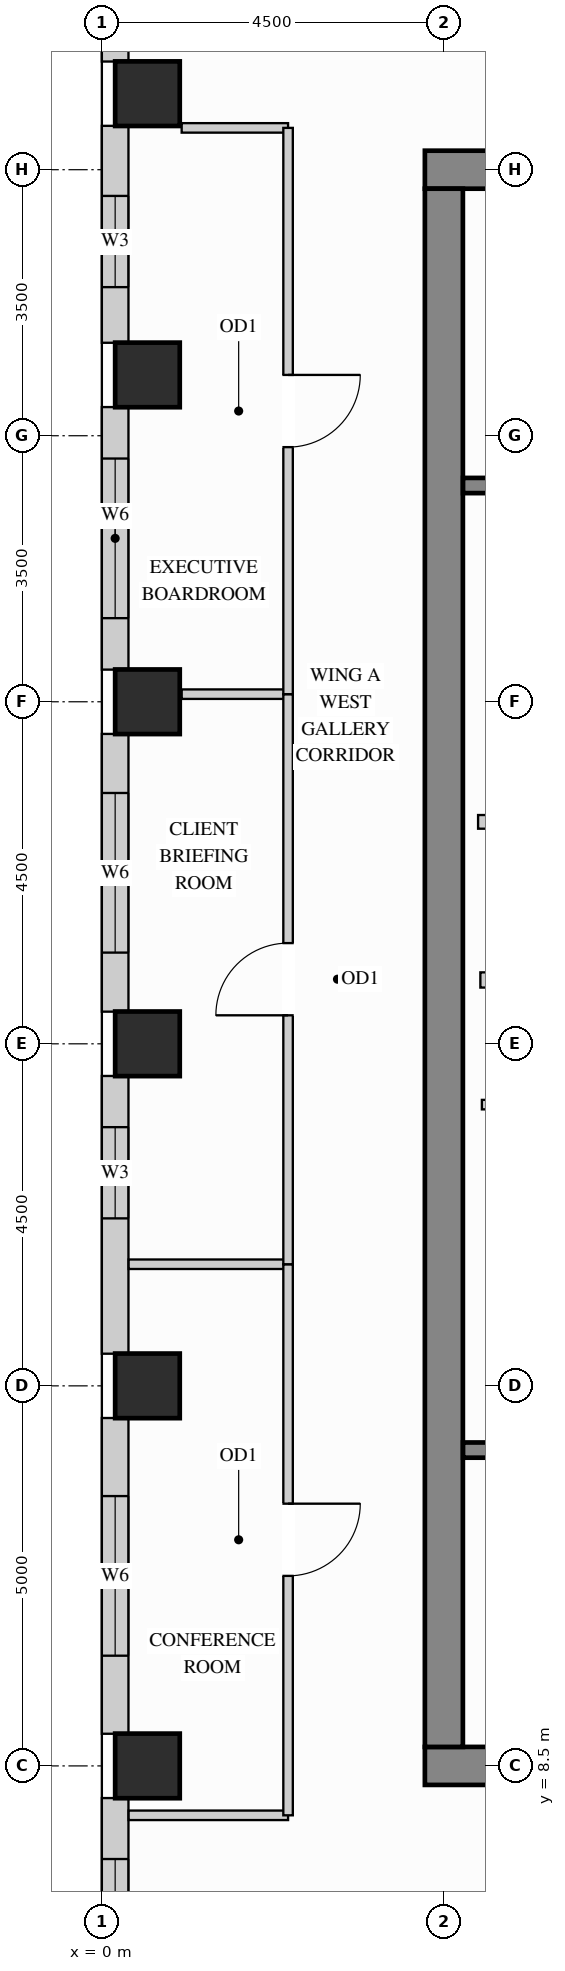
"""IFC4 building model, lengths in metres.
Left out: names, types, materials, properties, quantities, classifications, styles, units other than length and angle.
Written with IfcOpenShell. Run it as: python <this file> out.ifc"""

import sys

from ifc_helpers import new_model, si_unit, direction, frame, frame_2d, origin, origin_2d, place, context, subcontext, project, spatial, rectangle, extrude, source, transform, mapped, element, fill, save


model = new_model("IFC4")
c1 = context("Model", 3, precision=1e-05, world=origin(), true_north=direction((0.0, 1.0)))
c2 = subcontext(c1, "Body", "Model", "MODEL_VIEW")
j1 = project(units=[si_unit("LENGTHUNIT", "METRE"), si_unit("PLANEANGLEUNIT", "RADIAN")], contexts=[c1])
p1 = place(None, origin())
s1 = spatial("IfcSite", under=j1, at=p1, CompositionType="ELEMENT")
p2 = place(p1, origin())
s2 = spatial("IfcBuilding", under=s1, at=p2, CompositionType="ELEMENT")
p3 = place(p2, frame((0.0, 0.0, 259.2)))
s3 = spatial("IfcBuildingStorey", under=s2, at=p3, CompositionType="ELEMENT", Elevation=259.2)
m1 = source(origin(), c2, "Body", "SweptSolid", [
    extrude(rectangle(XDim=0.85, YDim=0.85, at=origin_2d()), origin(), (0.0, 0.0, 1.0), 3.4),
])
for number, where, z_axis, x_axis in (
    (1, (0.6, 13.5, 0.0), (0.0, 0.0, 1.0), (1.0, 0.0, 0.0)),
    (2, (0.6, 18.0, 0.0), (0.0, 0.0, 1.0), (1.0, 0.0, 0.0)),
    (3, (0.6, 22.5, 0.0), (0.0, 0.0, 1.0), (1.0, 0.0, 0.0)),
    (4, (0.6, 26.8, 0.0), (0.0, 0.0, 1.0), (1.0, 0.0, 0.0)),
    (5, (0.6, 30.5, 0.0), (0.0, 0.0, 1.0), (1.0, 0.0, 0.0)),
    (6, (0.6, 8.5, 0.0), (0.0, 0.0, 1.0), (1.0, 0.0, 0.0)),
):
    element("IfcColumn", number, at=place(p3, frame(where, z_axis=z_axis, x_axis=x_axis)), inside=s3, PredefinedType="COLUMN", context=c2, shape_type="MappedRepresentation", body=[
        mapped(m1, transform((0.0, 0.0, 0.0), x_axis=(1.0, 0.0, 0.0), y_axis=(0.0, 1.0, 0.0), z_axis=(0.0, 0.0, 1.0))),
    ])
m2 = source(origin(), c2, "Body", "SweptSolid", [
    extrude(rectangle(XDim=10.5, YDim=0.5, at=frame_2d((5.25, 0.0))), origin(), (0.0, 0.0, 1.0), 3.4),
])
for number, where, z_axis, x_axis in (
    (7, (4.25, 29.5, 0.0), (0.0, 0.0, 1.0), (1.0, 0.0, 0.0)),
    (8, (4.25, 8.5, 0.0), (0.0, 0.0, 1.0), (1.0, 0.0, 0.0)),
):
    element("IfcWall", number, at=place(p3, frame(where, z_axis=z_axis, x_axis=x_axis)), inside=s3, PredefinedType="SHEAR", context=c2, shape_type="MappedRepresentation", body=[
        mapped(m2, transform((0.0, 0.0, 0.0), x_axis=(1.0, 0.0, 0.0), y_axis=(0.0, 1.0, 0.0), z_axis=(0.0, 0.0, 1.0))),
    ])
m3 = source(origin(), c2, "Body", "SweptSolid", [
    extrude(rectangle(XDim=20.5, YDim=0.5, at=frame_2d((10.25, 0.0))), origin(), (0.0, 0.0, 1.0), 3.4),
])
p4 = place(p3, frame((4.5, 8.75, 0.0), z_axis=(0.0, 0.0, 1.0), x_axis=(0.0, 1.0, 0.0)))
e9 = element("IfcWall", 9, at=p4, inside=s3, PredefinedType="SHEAR", context=c2, shape_type="MappedRepresentation", body=[
    mapped(m3, transform((0.0, 0.0, 0.0), x_axis=(1.0, 0.0, 0.0), y_axis=(0.0, 1.0, 0.0), z_axis=(0.0, 0.0, 1.0))),
])
m4 = source(origin(), c2, "Body", "SweptSolid", [
    extrude(rectangle(XDim=0.527, YDim=0.35, at=frame_2d((0.263, 0.0))), origin(), (0.0, 0.0, 1.0), 3.385),
])
p5 = place(p3, frame((0.175, 31.45, 0.0), z_axis=(0.0, 0.0, 1.0), x_axis=(0.0, -1.0, 0.0)))
e10 = element("IfcWall", 10, at=p5, inside=s3, PredefinedType="SOLIDWALL", context=c2, shape_type="MappedRepresentation", body=[
    mapped(m4, transform((0.0, 0.0, 0.0), x_axis=(1.0, 0.0, 0.0), y_axis=(0.0, 1.0, 0.0), z_axis=(0.0, 0.0, 1.0))),
])
p6 = place(p3, frame((0.175, 30.077, 0.0), z_axis=(0.0, 0.0, 1.0), x_axis=(0.0, -1.0, 0.0)))
e11 = element("IfcWall", 11, at=p6, inside=s3, PredefinedType="SOLIDWALL", context=c2, shape_type="SweptSolid", body=[
    extrude(rectangle(XDim=2.854, YDim=0.35, at=frame_2d((1.427, 0.0))), origin(), (0.0, 0.0, 1.0), 3.385),
])
p7 = place(p6, frame((0.922, 0.0, 0.78)))
e12 = element("IfcOpeningElement", 12, at=p7, cuts=e11, PredefinedType="OPENING", context=c2, shape_type="SweptSolid", body=[
    extrude(rectangle(XDim=1.2, YDim=2.25, at=frame_2d((0.6, 1.125))), frame((0.0, 0.185, 0.0), z_axis=(0.0, -1.0, 0.0), x_axis=(1.0, 0.0, 0.0)), (0.0, 0.0, 1.0), 0.37),
])
p8 = place(p3, frame((0.175, 26.377, 0.0), z_axis=(0.0, 0.0, 1.0), x_axis=(0.0, -1.0, 0.0)))
e13 = element("IfcWall", 13, at=p8, inside=s3, PredefinedType="SOLIDWALL", context=c2, shape_type="SweptSolid", body=[
    extrude(rectangle(XDim=3.454, YDim=0.35, at=frame_2d((1.727, 0.0))), origin(), (0.0, 0.0, 1.0), 3.385),
])
p9 = place(p8, frame((0.677, 0.0, 0.78)))
e14 = element("IfcOpeningElement", 14, at=p9, cuts=e13, PredefinedType="OPENING", context=c2, shape_type="SweptSolid", body=[
    extrude(rectangle(XDim=2.1, YDim=2.25, at=frame_2d((1.05, 1.125))), frame((0.0, 0.185, 0.0), z_axis=(0.0, -1.0, 0.0), x_axis=(1.0, 0.0, 0.0)), (0.0, 0.0, 1.0), 0.37),
])
p10 = place(p3, frame((0.175, 22.077, 0.0), z_axis=(0.0, 0.0, 1.0), x_axis=(0.0, -1.0, 0.0)))
e15 = element("IfcWall", 15, at=p10, inside=s3, PredefinedType="SOLIDWALL", context=c2, shape_type="SweptSolid", body=[
    extrude(rectangle(XDim=3.654, YDim=0.35, at=frame_2d((1.827, 0.0))), origin(), (0.0, 0.0, 1.0), 3.385),
])
p11 = place(p10, frame((0.777, 0.0, 0.78)))
e16 = element("IfcOpeningElement", 16, at=p11, cuts=e15, PredefinedType="OPENING", context=c2, shape_type="SweptSolid", body=[
    extrude(rectangle(XDim=2.1, YDim=2.25, at=frame_2d((1.05, 1.125))), frame((0.0, 0.185, 0.0), z_axis=(0.0, -1.0, 0.0), x_axis=(1.0, 0.0, 0.0)), (0.0, 0.0, 1.0), 0.37),
])
p12 = place(p3, frame((0.175, 17.577, 0.0), z_axis=(0.0, 0.0, 1.0), x_axis=(0.0, -1.0, 0.0)))
e17 = element("IfcWall", 17, at=p12, inside=s3, PredefinedType="SOLIDWALL", context=c2, shape_type="SweptSolid", body=[
    extrude(rectangle(XDim=3.654, YDim=0.35, at=frame_2d((1.827, 0.0))), origin(), (0.0, 0.0, 1.0), 3.385),
])
p13 = place(p12, frame((0.674, 0.0, 0.78)))
e18 = element("IfcOpeningElement", 18, at=p13, cuts=e17, PredefinedType="OPENING", context=c2, shape_type="SweptSolid", body=[
    extrude(rectangle(XDim=1.2, YDim=2.25, at=frame_2d((0.6, 1.125))), frame((0.0, 0.185, 0.0), z_axis=(0.0, -1.0, 0.0), x_axis=(1.0, 0.0, 0.0)), (0.0, 0.0, 1.0), 0.37),
])
p14 = place(p3, frame((0.175, 13.077, 0.0), z_axis=(0.0, 0.0, 1.0), x_axis=(0.0, -1.0, 0.0)))
e19 = element("IfcWall", 19, at=p14, inside=s3, PredefinedType="SOLIDWALL", context=c2, shape_type="SweptSolid", body=[
    extrude(rectangle(XDim=4.154, YDim=0.35, at=frame_2d((2.077, 0.0))), origin(), (0.0, 0.0, 1.0), 3.385),
])
p15 = place(p14, frame((1.027, 0.0, 0.78)))
e20 = element("IfcOpeningElement", 20, at=p15, cuts=e19, PredefinedType="OPENING", context=c2, shape_type="SweptSolid", body=[
    extrude(rectangle(XDim=2.1, YDim=2.25, at=frame_2d((1.05, 1.125))), frame((0.0, 0.185, 0.0), z_axis=(0.0, -1.0, 0.0), x_axis=(1.0, 0.0, 0.0)), (0.0, 0.0, 1.0), 0.37),
])
p16 = place(p3, frame((0.175, 8.077, 0.0), z_axis=(0.0, 0.0, 1.0), x_axis=(0.0, -1.0, 0.0)))
e21 = element("IfcWall", 21, at=p16, inside=s3, PredefinedType="SOLIDWALL", context=c2, shape_type="SweptSolid", body=[
    extrude(rectangle(XDim=4.154, YDim=0.35, at=frame_2d((2.077, 0.0))), origin(), (0.0, 0.0, 1.0), 3.385),
])
p17 = place(p16, frame((0.802, 0.0, 0.78)))
e22 = element("IfcOpeningElement", 22, at=p17, cuts=e21, PredefinedType="OPENING", context=c2, shape_type="SweptSolid", body=[
    extrude(rectangle(XDim=1.2, YDim=2.25, at=frame_2d((0.6, 1.125))), frame((0.0, 0.185, 0.0), z_axis=(0.0, -1.0, 0.0), x_axis=(1.0, 0.0, 0.0)), (0.0, 0.0, 1.0), 0.37),
])
m5 = source(origin(), c2, "Body", "SweptSolid", [
    extrude(rectangle(XDim=2.2, YDim=0.18, at=frame_2d((1.1, 0.0))), origin(), (0.0, 0.0, 1.0), 3.385),
])
p18 = place(p3, frame((4.95, 20.92, 0.0), z_axis=(0.0, 0.0, 1.0), x_axis=(1.0, 0.0, 0.0)))
e23 = element("IfcWall", 23, at=p18, inside=s3, PredefinedType="PARTITIONING", context=c2, shape_type="MappedRepresentation", body=[
    mapped(m5, transform((0.0, 0.0, 0.0), x_axis=(1.0, 0.0, 0.0), y_axis=(0.0, 1.0, 0.0), z_axis=(0.0, 0.0, 1.0))),
])
p19 = place(p3, frame((5.0, 17.2, 0.0), z_axis=(0.0, 0.0, 1.0), x_axis=(1.0, 0.0, 0.0)))
e24 = element("IfcWall", 24, at=p19, inside=s3, PredefinedType="PARTITIONING", context=c2, shape_type="SweptSolid", body=[
    extrude(rectangle(XDim=2.4, YDim=0.125, at=frame_2d((1.2, 0.0))), origin(), (0.0, 0.0, 1.0), 3.385),
])
p20 = place(p19, frame((0.7, 0.0, 0.0)))
e25 = element("IfcOpeningElement", 25, at=p20, cuts=e24, PredefinedType="OPENING", context=c2, shape_type="SweptSolid", body=[
    extrude(rectangle(XDim=0.85, YDim=2.1, at=frame_2d((0.425, 1.05))), frame((0.0, 0.073, 0.0), z_axis=(0.0, -1.0, 0.0), x_axis=(1.0, 0.0, 0.0)), (0.0, 0.0, 1.0), 0.145),
])
m6 = source(origin(), c2, "Body", "SweptSolid", [
    extrude(rectangle(XDim=1.4, YDim=0.125, at=frame_2d((0.7, 0.0))), origin(), (0.0, 0.0, 1.0), 1.585),
])
p21 = place(p3, frame((1.05, 30.05, 0.0), z_axis=(0.0, 0.0, 1.0), x_axis=(1.0, 0.0, 0.0)))
e26 = element("IfcWall", 26, at=p21, inside=s3, PredefinedType="PARTITIONING", context=c2, shape_type="MappedRepresentation", body=[
    mapped(m6, transform((0.0, 0.0, 0.0), x_axis=(1.0, 0.0, 0.0), y_axis=(0.0, 1.0, 0.0), z_axis=(0.0, 0.0, 1.0))),
])
m7 = source(origin(), c2, "Body", "SweptSolid", [
    extrude(rectangle(XDim=2.098, YDim=0.125, at=frame_2d((1.049, 0.0))), origin(), (0.0, 0.0, 1.0), 3.385),
])
for number, where, z_axis, x_axis in (
    (27, (0.352, 7.85, 0.0), (0.0, 0.0, 1.0), (1.0, 0.0, 0.0)),
    (28, (0.352, 15.1, 0.0), (0.0, 0.0, 1.0), (1.0, 0.0, 0.0)),
):
    element("IfcWall", number, at=place(p3, frame(where, z_axis=z_axis, x_axis=x_axis)), inside=s3, PredefinedType="PARTITIONING", context=c2, shape_type="MappedRepresentation", body=[
        mapped(m7, transform((0.0, 0.0, 0.0), x_axis=(1.0, 0.0, 0.0), y_axis=(0.0, 1.0, 0.0), z_axis=(0.0, 0.0, 1.0))),
    ])
m8 = source(origin(), c2, "Body", "SweptSolid", [
    extrude(rectangle(XDim=1.4, YDim=0.125, at=frame_2d((0.7, 0.0))), origin(), (0.0, 0.0, 1.0), 3.385),
])
p22 = place(p3, frame((1.05, 22.6, 0.0), z_axis=(0.0, 0.0, 1.0), x_axis=(1.0, 0.0, 0.0)))
e29 = element("IfcWall", 29, at=p22, inside=s3, PredefinedType="PARTITIONING", context=c2, shape_type="MappedRepresentation", body=[
    mapped(m8, transform((0.0, 0.0, 0.0), x_axis=(1.0, 0.0, 0.0), y_axis=(0.0, 1.0, 0.0), z_axis=(0.0, 0.0, 1.0))),
])
p23 = place(p3, frame((2.45, 7.85, 0.0), z_axis=(0.0, 0.0, 1.0), x_axis=(0.0, 1.0, 0.0)))
e30 = element("IfcWall", 30, at=p23, inside=s3, PredefinedType="PARTITIONING", context=c2, shape_type="SweptSolid", body=[
    extrude(rectangle(XDim=7.25, YDim=0.125, at=frame_2d((3.625, 0.0))), origin(), (0.0, 0.0, 1.0), 3.385),
])
p24 = place(p23, frame((3.15, 0.0, 0.0)))
e31 = element("IfcOpeningElement", 31, at=p24, cuts=e30, PredefinedType="OPENING", context=c2, shape_type="SweptSolid", body=[
    extrude(rectangle(XDim=0.95, YDim=2.15, at=frame_2d((0.475, 1.075))), frame((0.0, 0.073, 0.0), z_axis=(0.0, -1.0, 0.0), x_axis=(1.0, 0.0, 0.0)), (0.0, 0.0, 1.0), 0.145),
])
p25 = place(p3, frame((2.45, 15.1, 0.0), z_axis=(0.0, 0.0, 1.0), x_axis=(0.0, 1.0, 0.0)))
e32 = element("IfcWall", 32, at=p25, inside=s3, PredefinedType="PARTITIONING", context=c2, shape_type="SweptSolid", body=[
    extrude(rectangle(XDim=7.5, YDim=0.125, at=frame_2d((3.75, 0.0))), origin(), (0.0, 0.0, 1.0), 3.385),
])
p26 = place(p25, frame((3.275, 0.0, 0.0)))
e33 = element("IfcOpeningElement", 33, at=p26, cuts=e32, PredefinedType="OPENING", context=c2, shape_type="SweptSolid", body=[
    extrude(rectangle(XDim=0.95, YDim=2.15, at=frame_2d((0.475, 1.075))), frame((0.0, 0.073, 0.0), z_axis=(0.0, -1.0, 0.0), x_axis=(1.0, 0.0, 0.0)), (0.0, 0.0, 1.0), 0.145),
])
p27 = place(p3, frame((2.45, 22.6, 0.0), z_axis=(0.0, 0.0, 1.0), x_axis=(0.0, 1.0, 0.0)))
e34 = element("IfcWall", 34, at=p27, inside=s3, PredefinedType="PARTITIONING", context=c2, shape_type="SweptSolid", body=[
    extrude(rectangle(XDim=7.45, YDim=0.125, at=frame_2d((3.725, 0.0))), origin(), (0.0, 0.0, 1.0), 3.385),
])
p28 = place(p27, frame((3.25, 0.0, 0.0)))
e35 = element("IfcOpeningElement", 35, at=p28, cuts=e34, PredefinedType="OPENING", context=c2, shape_type="SweptSolid", body=[
    extrude(rectangle(XDim=0.95, YDim=2.15, at=frame_2d((0.475, 1.075))), frame((0.0, 0.073, 0.0), z_axis=(0.0, -1.0, 0.0), x_axis=(1.0, 0.0, 0.0)), (0.0, 0.0, 1.0), 0.145),
])
m9 = source(origin(), c2, "Body", "SweptSolid", [
    extrude(rectangle(XDim=2.09, YDim=0.2, at=frame_2d((1.045, 0.0))), origin(), (0.0, 0.0, 1.0), 3.385),
])
p29 = place(p3, frame((4.98, 18.84, 0.0), z_axis=(0.0, 0.0, 1.0), x_axis=(1.0, 0.0, 0.0)))
e36 = element("IfcWall", 36, at=p29, inside=s3, PredefinedType="PARTITIONING", context=c2, shape_type="MappedRepresentation", body=[
    mapped(m9, transform((0.0, 0.0, 0.0), x_axis=(1.0, 0.0, 0.0), y_axis=(0.0, 1.0, 0.0), z_axis=(0.0, 0.0, 1.0))),
])
p30 = place(p3, frame((4.752, 12.655, 0.0), z_axis=(0.0, 0.0, 1.0), x_axis=(1.0, 0.0, 0.0)))
e37 = element("IfcWall", 37, at=p30, inside=s3, PredefinedType="SHEAR", context=c2, shape_type="SweptSolid", body=[
    extrude(rectangle(XDim=7.653, YDim=0.2, at=frame_2d((3.827, 0.0))), origin(), (0.0, 0.0, 1.0), 3.4),
])
p31 = place(p30, frame((0.4, 0.0, 0.0)))
e38 = element("IfcOpeningElement", 38, at=p31, cuts=e37, PredefinedType="OPENING", context=c2, shape_type="SweptSolid", body=[
    extrude(rectangle(XDim=1.1, YDim=2.15, at=frame_2d((0.55, 1.075))), frame((0.0, 0.11, 0.0), z_axis=(0.0, -1.0, 0.0), x_axis=(1.0, 0.0, 0.0)), (0.0, 0.0, 1.0), 0.22),
])
p32 = place(p3, frame((4.752, 25.345, 0.0), z_axis=(0.0, 0.0, 1.0), x_axis=(1.0, 0.0, 0.0)))
e39 = element("IfcWall", 39, at=p32, inside=s3, PredefinedType="SHEAR", context=c2, shape_type="SweptSolid", body=[
    extrude(rectangle(XDim=7.653, YDim=0.2, at=frame_2d((3.827, 0.0))), origin(), (0.0, 0.0, 1.0), 3.4),
])
p33 = place(p32, frame((0.4, 0.0, 0.0)))
e40 = element("IfcOpeningElement", 40, at=p33, cuts=e39, PredefinedType="OPENING", context=c2, shape_type="SweptSolid", body=[
    extrude(rectangle(XDim=1.1, YDim=2.15, at=frame_2d((0.55, 1.075))), frame((0.0, 0.11, 0.0), z_axis=(0.0, -1.0, 0.0), x_axis=(1.0, 0.0, 0.0)), (0.0, 0.0, 1.0), 0.22),
])
m10 = source(origin(), c2, "Body", "SweptSolid", [
    extrude(rectangle(XDim=0.95, YDim=2.15, at=frame_2d((0.475, 1.075))), frame((0.0, 0.025, 0.0), z_axis=(0.0, -1.0, 0.0), x_axis=(1.0, 0.0, 0.0)), (0.0, 0.0, 1.0), 0.05),
])
p34 = place(p24, origin())
e41 = element("IfcDoor", 41, at=p34, inside=s3, OperationType="SINGLE_SWING_RIGHT", PredefinedType="DOOR", context=c2, shape_type="MappedRepresentation", body=[
    mapped(m10, transform((0.0, 0.0, 0.0), x_axis=(1.0, 0.0, 0.0), y_axis=(0.0, 1.0, 0.0), z_axis=(0.0, 0.0, 1.0))),
])
fill(e31, e41)
p35 = place(p26, origin())
e42 = element("IfcDoor", 42, at=p35, inside=s3, OperationType="SINGLE_SWING_LEFT", PredefinedType="DOOR", context=c2, shape_type="MappedRepresentation", body=[
    mapped(m10, transform((0.0, 0.0, 0.0), x_axis=(1.0, 0.0, 0.0), y_axis=(0.0, 1.0, 0.0), z_axis=(0.0, 0.0, 1.0))),
])
fill(e33, e42)
p36 = place(p28, origin())
e43 = element("IfcDoor", 43, at=p36, inside=s3, OperationType="SINGLE_SWING_RIGHT", PredefinedType="DOOR", context=c2, shape_type="MappedRepresentation", body=[
    mapped(m10, transform((0.0, 0.0, 0.0), x_axis=(1.0, 0.0, 0.0), y_axis=(0.0, 1.0, 0.0), z_axis=(0.0, 0.0, 1.0))),
])
fill(e35, e43)
m11 = source(origin(), c2, "Body", "SweptSolid", [
    extrude(rectangle(XDim=1.2, YDim=2.25, at=frame_2d((0.6, 1.125))), frame((0.0, 0.03, 0.0), z_axis=(0.0, -1.0, 0.0), x_axis=(1.0, 0.0, 0.0)), (0.0, 0.0, 1.0), 0.06),
])
p37 = place(p7, origin())
e44 = element("IfcWindow", 44, at=p37, inside=s3, PartitioningType="SINGLE_PANEL", PredefinedType="WINDOW", context=c2, shape_type="MappedRepresentation", body=[
    mapped(m11, transform((0.0, 0.0, 0.0), x_axis=(1.0, 0.0, 0.0), y_axis=(0.0, 1.0, 0.0), z_axis=(0.0, 0.0, 1.0))),
])
fill(e12, e44)
p38 = place(p13, origin())
e45 = element("IfcWindow", 45, at=p38, inside=s3, PartitioningType="SINGLE_PANEL", PredefinedType="WINDOW", context=c2, shape_type="MappedRepresentation", body=[
    mapped(m11, transform((0.0, 0.0, 0.0), x_axis=(1.0, 0.0, 0.0), y_axis=(0.0, 1.0, 0.0), z_axis=(0.0, 0.0, 1.0))),
])
fill(e18, e45)
p39 = place(p17, origin())
e46 = element("IfcWindow", 46, at=p39, inside=s3, PartitioningType="SINGLE_PANEL", PredefinedType="WINDOW", context=c2, shape_type="MappedRepresentation", body=[
    mapped(m11, transform((0.0, 0.0, 0.0), x_axis=(1.0, 0.0, 0.0), y_axis=(0.0, 1.0, 0.0), z_axis=(0.0, 0.0, 1.0))),
])
fill(e22, e46)
m12 = source(origin(), c2, "Body", "SweptSolid", [
    extrude(rectangle(XDim=2.1, YDim=2.25, at=frame_2d((1.05, 1.125))), frame((0.0, 0.03, 0.0), z_axis=(0.0, -1.0, 0.0), x_axis=(1.0, 0.0, 0.0)), (0.0, 0.0, 1.0), 0.06),
])
p40 = place(p9, origin())
e47 = element("IfcWindow", 47, at=p40, inside=s3, PartitioningType="SINGLE_PANEL", PredefinedType="WINDOW", context=c2, shape_type="MappedRepresentation", body=[
    mapped(m12, transform((0.0, 0.0, 0.0), x_axis=(1.0, 0.0, 0.0), y_axis=(0.0, 1.0, 0.0), z_axis=(0.0, 0.0, 1.0))),
])
fill(e14, e47)
p41 = place(p11, origin())
e48 = element("IfcWindow", 48, at=p41, inside=s3, PartitioningType="SINGLE_PANEL", PredefinedType="WINDOW", context=c2, shape_type="MappedRepresentation", body=[
    mapped(m12, transform((0.0, 0.0, 0.0), x_axis=(1.0, 0.0, 0.0), y_axis=(0.0, 1.0, 0.0), z_axis=(0.0, 0.0, 1.0))),
])
fill(e16, e48)
p42 = place(p15, origin())
e49 = element("IfcWindow", 49, at=p42, inside=s3, PartitioningType="SINGLE_PANEL", PredefinedType="WINDOW", context=c2, shape_type="MappedRepresentation", body=[
    mapped(m12, transform((0.0, 0.0, 0.0), x_axis=(1.0, 0.0, 0.0), y_axis=(0.0, 1.0, 0.0), z_axis=(0.0, 0.0, 1.0))),
])
fill(e20, e49)
save(model, sys.argv[1])
